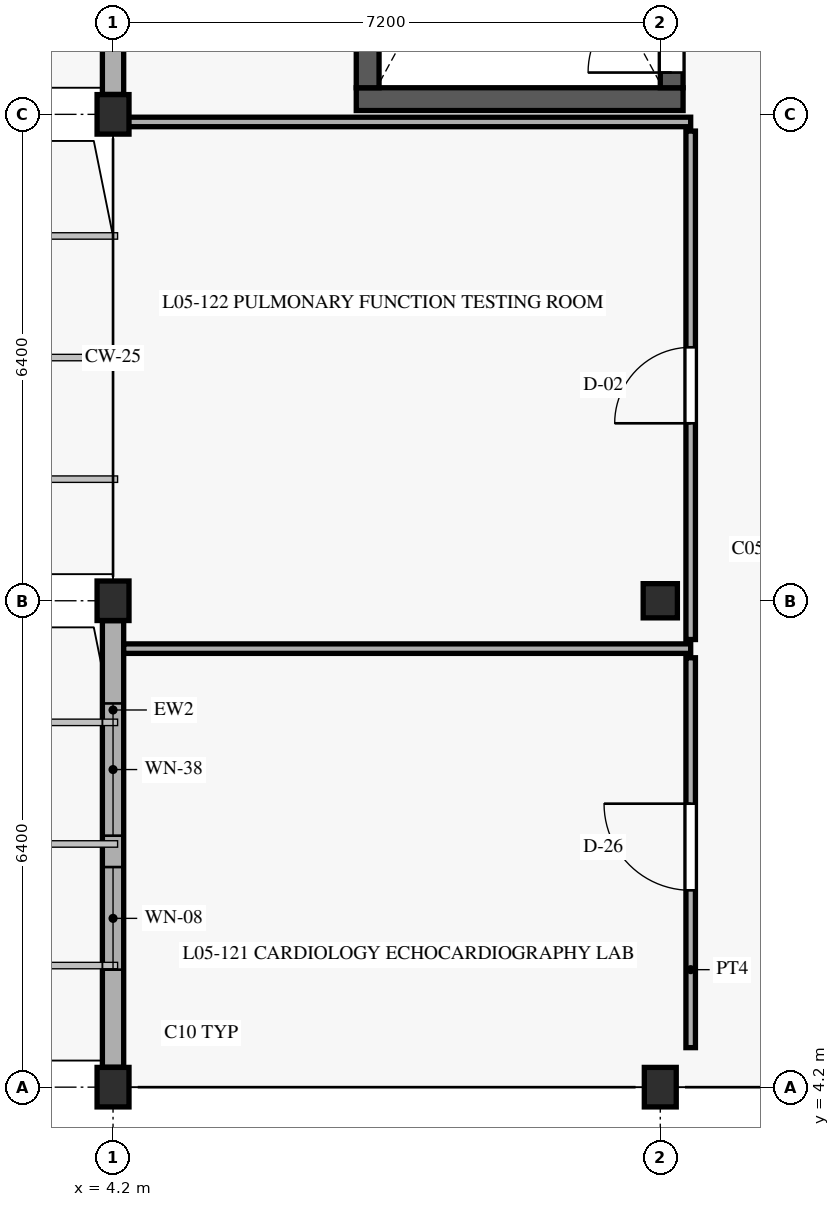
"""IFC4 building model, lengths in metres.
Left out: names, types, materials, properties, quantities, classifications, styles, units other than length and angle.
Written with IfcOpenShell. Run it as: python <this file> out.ifc"""

import sys

from ifc_helpers import new_model, si_unit, direction, frame, frame_2d, origin, origin_with_axes, origin_2d, place, context, subcontext, project, spatial, rectangle, extrude, element, fill, save


model = new_model("IFC4")
c1 = context("Model", 3, precision=1e-05, world=origin(), true_north=direction((0.0, 1.0)))
c2 = subcontext(c1, "Body", "Model", "MODEL_VIEW")
j1 = project(units=[si_unit("LENGTHUNIT", "METRE"), si_unit("PLANEANGLEUNIT", "RADIAN")], contexts=[c1])
p1 = place(None, origin())
s1 = spatial("IfcSite", under=j1, at=p1, CompositionType="ELEMENT")
p2 = place(p1, origin())
s2 = spatial("IfcBuilding", under=s1, at=p2, CompositionType="ELEMENT")
p3 = place(p2, frame((0.0, 0.0, 17.55)))
s3 = spatial("IfcBuildingStorey", under=s2, at=p3, CompositionType="ELEMENT", Elevation=17.55)
for number, where, z_axis, x_axis in (
    (1, (4.2, 4.2, 0.0), (0.0, 0.0, 1.0), (1.0, 0.0, 0.0)),
    (2, (4.2, 10.6, 0.0), (0.0, 0.0, 1.0), (1.0, 0.0, 0.0)),
    (3, (4.2, 17.0, 0.0), (0.0, 0.0, 1.0), (1.0, 0.0, 0.0)),
    (4, (11.4, 4.2, 0.0), (0.0, 0.0, 1.0), (1.0, 0.0, 0.0)),
):
    element("IfcColumn", number, at=place(p3, frame(where, z_axis=z_axis, x_axis=x_axis)), inside=s3, PredefinedType="COLUMN", context=c2, shape_type="SweptSolid", body=[
        extrude(rectangle(XDim=0.42, YDim=0.52, at=origin_2d()), origin(), (0.0, 0.0, 1.0), 4.05),
    ])
p4 = place(p3, frame((11.4, 10.6, 0.0), z_axis=(0.0, 0.0, 1.0), x_axis=(1.0, 0.0, 0.0)))
e5 = element("IfcColumn", 5, at=p4, inside=s3, PredefinedType="COLUMN", context=c2, shape_type="SweptSolid", body=[
    extrude(rectangle(XDim=0.45, YDim=0.45, at=origin_2d()), origin(), (0.0, 0.0, 1.0), 4.05),
])
p5 = place(p3, frame((7.4, 17.2, 0.0), z_axis=(0.0, 0.0, 1.0), x_axis=(1.0, 0.0, 0.0)))
e6 = element("IfcWall", 6, at=p5, inside=s3, PredefinedType="SHEAR", context=c2, shape_type="SweptSolid", body=[
    extrude(rectangle(XDim=4.3, YDim=0.3, at=frame_2d((2.15, 0.0))), origin(), (0.0, 0.0, 1.0), 3.77),
])
p6 = place(p3, frame((7.55, 29.05, 0.0), z_axis=(0.0, 0.0, 1.0), x_axis=(0.0, -1.0, 0.0)))
e7 = element("IfcWall", 7, at=p6, inside=s3, PredefinedType="SHEAR", context=c2, shape_type="SweptSolid", body=[
    extrude(rectangle(XDim=11.7, YDim=0.3, at=frame_2d((5.85, 0.0))), origin(), (0.0, 0.0, 1.0), 3.77),
])
p7 = place(p3, frame((11.55, 17.35, 0.0), z_axis=(0.0, 0.0, 1.0), x_axis=(0.0, 1.0, 0.0)))
e8 = element("IfcWall", 8, at=p7, inside=s3, PredefinedType="SHEAR", context=c2, shape_type="SweptSolid", body=[
    extrude(rectangle(XDim=11.7, YDim=0.3, at=frame_2d((5.85, 0.0))), origin(), (0.0, 0.0, 1.0), 3.77),
])
p8 = place(p7, frame((0.2, 0.0, 0.0)))
e9 = element("IfcOpeningElement", 9, at=p8, cuts=e8, PredefinedType="OPENING", context=c2, shape_type="SweptSolid", body=[
    extrude(rectangle(XDim=1.1, YDim=2.2, at=frame_2d((0.55, 1.1))), frame((0.0, 0.16, 0.0), z_axis=(0.0, -1.0, 0.0), x_axis=(1.0, 0.0, 0.0)), (0.0, 0.0, 1.0), 0.32),
])
p9 = place(p7, frame((7.875, 0.0, 0.0)))
e10 = element("IfcOpeningElement", 10, at=p9, cuts=e8, PredefinedType="OPENING", context=c2, shape_type="SweptSolid", body=[
    extrude(rectangle(XDim=1.15, YDim=2.2, at=frame_2d((0.575, 1.1))), frame((0.0, 0.16, 0.0), z_axis=(0.0, -1.0, 0.0), x_axis=(1.0, 0.0, 0.0)), (0.0, 0.0, 1.0), 0.32),
])
p10 = place(p7, frame((10.14, 0.0, 0.0)))
e11 = element("IfcOpeningElement", 11, at=p10, cuts=e8, PredefinedType="OPENING", context=c2, shape_type="SweptSolid", body=[
    extrude(rectangle(XDim=1.02, YDim=2.15, at=frame_2d((0.51, 1.075))), frame((0.0, 0.16, 0.0), z_axis=(0.0, -1.0, 0.0), x_axis=(1.0, 0.0, 0.0)), (0.0, 0.0, 1.0), 0.32),
])
p11 = place(p3, frame((4.2, 10.338, 0.0), z_axis=(0.0, 0.0, 1.0), x_axis=(0.0, -1.0, 0.0)))
e12 = element("IfcWall", 12, at=p11, inside=s3, PredefinedType="SOLIDWALL", context=c2, shape_type="SweptSolid", body=[
    extrude(rectangle(XDim=5.876, YDim=0.28, at=frame_2d((2.938, 0.0))), origin(), (0.0, 0.0, 1.0), 3.35),
])
p12 = place(p11, frame((1.089, 0.0, 0.88)))
e13 = element("IfcOpeningElement", 13, at=p12, cuts=e12, PredefinedType="OPENING", context=c2, shape_type="SweptSolid", body=[
    extrude(rectangle(XDim=1.74, YDim=1.9, at=frame_2d((0.87, 0.95))), frame((0.0, 0.15, 0.0), z_axis=(0.0, -1.0, 0.0), x_axis=(1.0, 0.0, 0.0)), (0.0, 0.0, 1.0), 0.3),
])
p13 = place(p11, frame((3.242, 0.0, 0.88)))
e14 = element("IfcOpeningElement", 14, at=p13, cuts=e12, PredefinedType="OPENING", context=c2, shape_type="SweptSolid", body=[
    extrude(rectangle(XDim=1.35, YDim=1.85, at=frame_2d((0.675, 0.925))), frame((0.0, 0.15, 0.0), z_axis=(0.0, -1.0, 0.0), x_axis=(1.0, 0.0, 0.0)), (0.0, 0.0, 1.0), 0.3),
])
p14 = place(p3, frame((4.2, 23.138, 0.0), z_axis=(0.0, 0.0, 1.0), x_axis=(0.0, -1.0, 0.0)))
e15 = element("IfcWall", 15, at=p14, inside=s3, PredefinedType="SOLIDWALL", context=c2, shape_type="SweptSolid", body=[
    extrude(rectangle(XDim=5.876, YDim=0.28, at=frame_2d((2.938, 0.0))), origin(), (0.0, 0.0, 1.0), 3.35),
])
p15 = place(p14, frame((1.299, 0.0, 0.88)))
e16 = element("IfcOpeningElement", 16, at=p15, cuts=e15, PredefinedType="OPENING", context=c2, shape_type="SweptSolid", body=[
    extrude(rectangle(XDim=1.32, YDim=2.15, at=frame_2d((0.66, 1.075))), frame((0.0, 0.15, 0.0), z_axis=(0.0, -1.0, 0.0), x_axis=(1.0, 0.0, 0.0)), (0.0, 0.0, 1.0), 0.3),
])
p16 = place(p14, frame((3.167, 0.0, 0.88)))
e17 = element("IfcOpeningElement", 17, at=p16, cuts=e15, PredefinedType="OPENING", context=c2, shape_type="SweptSolid", body=[
    extrude(rectangle(XDim=1.5, YDim=1.85, at=frame_2d((0.75, 0.925))), frame((0.0, 0.15, 0.0), z_axis=(0.0, -1.0, 0.0), x_axis=(1.0, 0.0, 0.0)), (0.0, 0.0, 1.0), 0.3),
])
p17 = place(p3, frame((11.8, 4.72, 0.0), z_axis=(0.0, 0.0, 1.0), x_axis=(0.0, 1.0, 0.0)))
e18 = element("IfcWall", 18, at=p17, inside=s3, PredefinedType="PARTITIONING", context=c2, shape_type="SweptSolid", body=[
    extrude(rectangle(XDim=5.13, YDim=0.125, at=frame_2d((2.565, 0.0))), origin(), (0.0, 0.0, 1.0), 3.765),
])
p18 = place(p17, frame((2.07, 0.0, 0.0)))
e19 = element("IfcOpeningElement", 19, at=p18, cuts=e18, PredefinedType="OPENING", context=c2, shape_type="SweptSolid", body=[
    extrude(rectangle(XDim=1.14, YDim=2.22, at=frame_2d((0.57, 1.11))), frame((0.0, 0.073, 0.0), z_axis=(0.0, -1.0, 0.0), x_axis=(1.0, 0.0, 0.0)), (0.0, 0.0, 1.0), 0.145),
])
p19 = place(p3, frame((4.34, 9.97, 0.0), z_axis=(0.0, 0.0, 1.0), x_axis=(1.0, 0.0, 0.0)))
e20 = element("IfcWall", 20, at=p19, inside=s3, PredefinedType="PARTITIONING", context=c2, shape_type="SweptSolid", body=[
    extrude(rectangle(XDim=7.46, YDim=0.125, at=frame_2d((3.73, 0.0))), origin(), (0.0, 0.0, 1.0), 3.345),
])
p20 = place(p3, frame((11.8, 10.09, 0.0), z_axis=(0.0, 0.0, 1.0), x_axis=(0.0, 1.0, 0.0)))
e21 = element("IfcWall", 21, at=p20, inside=s3, PredefinedType="PARTITIONING", context=c2, shape_type="SweptSolid", body=[
    extrude(rectangle(XDim=6.69, YDim=0.125, at=frame_2d((3.345, 0.0))), origin(), (0.0, 0.0, 1.0), 3.365),
])
p21 = place(p20, frame((2.845, 0.0, 0.0)))
e22 = element("IfcOpeningElement", 22, at=p21, cuts=e21, PredefinedType="OPENING", context=c2, shape_type="SweptSolid", body=[
    extrude(rectangle(XDim=1.0, YDim=2.15, at=frame_2d((0.5, 1.075))), frame((0.0, 0.073, 0.0), z_axis=(0.0, -1.0, 0.0), x_axis=(1.0, 0.0, 0.0)), (0.0, 0.0, 1.0), 0.145),
])
p22 = place(p3, frame((4.34, 16.9, 0.0), z_axis=(0.0, 0.0, 1.0), x_axis=(1.0, 0.0, 0.0)))
e23 = element("IfcWall", 23, at=p22, inside=s3, PredefinedType="PARTITIONING", context=c2, shape_type="SweptSolid", body=[
    extrude(rectangle(XDim=7.46, YDim=0.125, at=frame_2d((3.73, 0.0))), origin(), (0.0, 0.0, 1.0), 3.365),
])
p23 = place(p8, origin_with_axes())
e24 = element("IfcDoor", 24, at=p23, inside=s3, OperationType="SINGLE_SWING_LEFT", PredefinedType="DOOR", context=c2, shape_type="SweptSolid", body=[
    extrude(rectangle(XDim=1.1, YDim=2.2, at=frame_2d((0.55, 1.1))), frame((0.0, 0.025, 0.0), z_axis=(0.0, -1.0, 0.0), x_axis=(1.0, 0.0, 0.0)), (0.0, 0.0, 1.0), 0.05),
])
fill(e9, e24)
p24 = place(p12, origin_with_axes())
e25 = element("IfcWindow", 25, at=p24, inside=s3, PartitioningType="SINGLE_PANEL", PredefinedType="WINDOW", context=c2, shape_type="SweptSolid", body=[
    extrude(rectangle(XDim=1.74, YDim=1.9, at=frame_2d((0.87, 0.95))), frame((0.0, 0.03, 0.0), z_axis=(0.0, -1.0, 0.0), x_axis=(1.0, 0.0, 0.0)), (0.0, 0.0, 1.0), 0.06),
])
fill(e13, e25)
p25 = place(p13, origin_with_axes())
e26 = element("IfcWindow", 26, at=p25, inside=s3, PartitioningType="SINGLE_PANEL", PredefinedType="WINDOW", context=c2, shape_type="SweptSolid", body=[
    extrude(rectangle(XDim=1.35, YDim=1.85, at=frame_2d((0.675, 0.925))), frame((0.0, 0.03, 0.0), z_axis=(0.0, -1.0, 0.0), x_axis=(1.0, 0.0, 0.0)), (0.0, 0.0, 1.0), 0.06),
])
fill(e14, e26)
p26 = place(p18, origin_with_axes())
e27 = element("IfcDoor", 27, at=p26, inside=s3, OperationType="SINGLE_SWING_RIGHT", PredefinedType="DOOR", context=c2, shape_type="SweptSolid", body=[
    extrude(rectangle(XDim=1.14, YDim=2.22, at=frame_2d((0.57, 1.11))), frame((0.0, 0.025, 0.0), z_axis=(0.0, -1.0, 0.0), x_axis=(1.0, 0.0, 0.0)), (0.0, 0.0, 1.0), 0.05),
])
fill(e19, e27)
p27 = place(p21, origin_with_axes())
e28 = element("IfcDoor", 28, at=p27, inside=s3, OperationType="SINGLE_SWING_LEFT", PredefinedType="DOOR", context=c2, shape_type="SweptSolid", body=[
    extrude(rectangle(XDim=1.0, YDim=2.15, at=frame_2d((0.5, 1.075))), frame((0.0, 0.025, 0.0), z_axis=(0.0, -1.0, 0.0), x_axis=(1.0, 0.0, 0.0)), (0.0, 0.0, 1.0), 0.05),
])
fill(e22, e28)
save(model, sys.argv[1])
